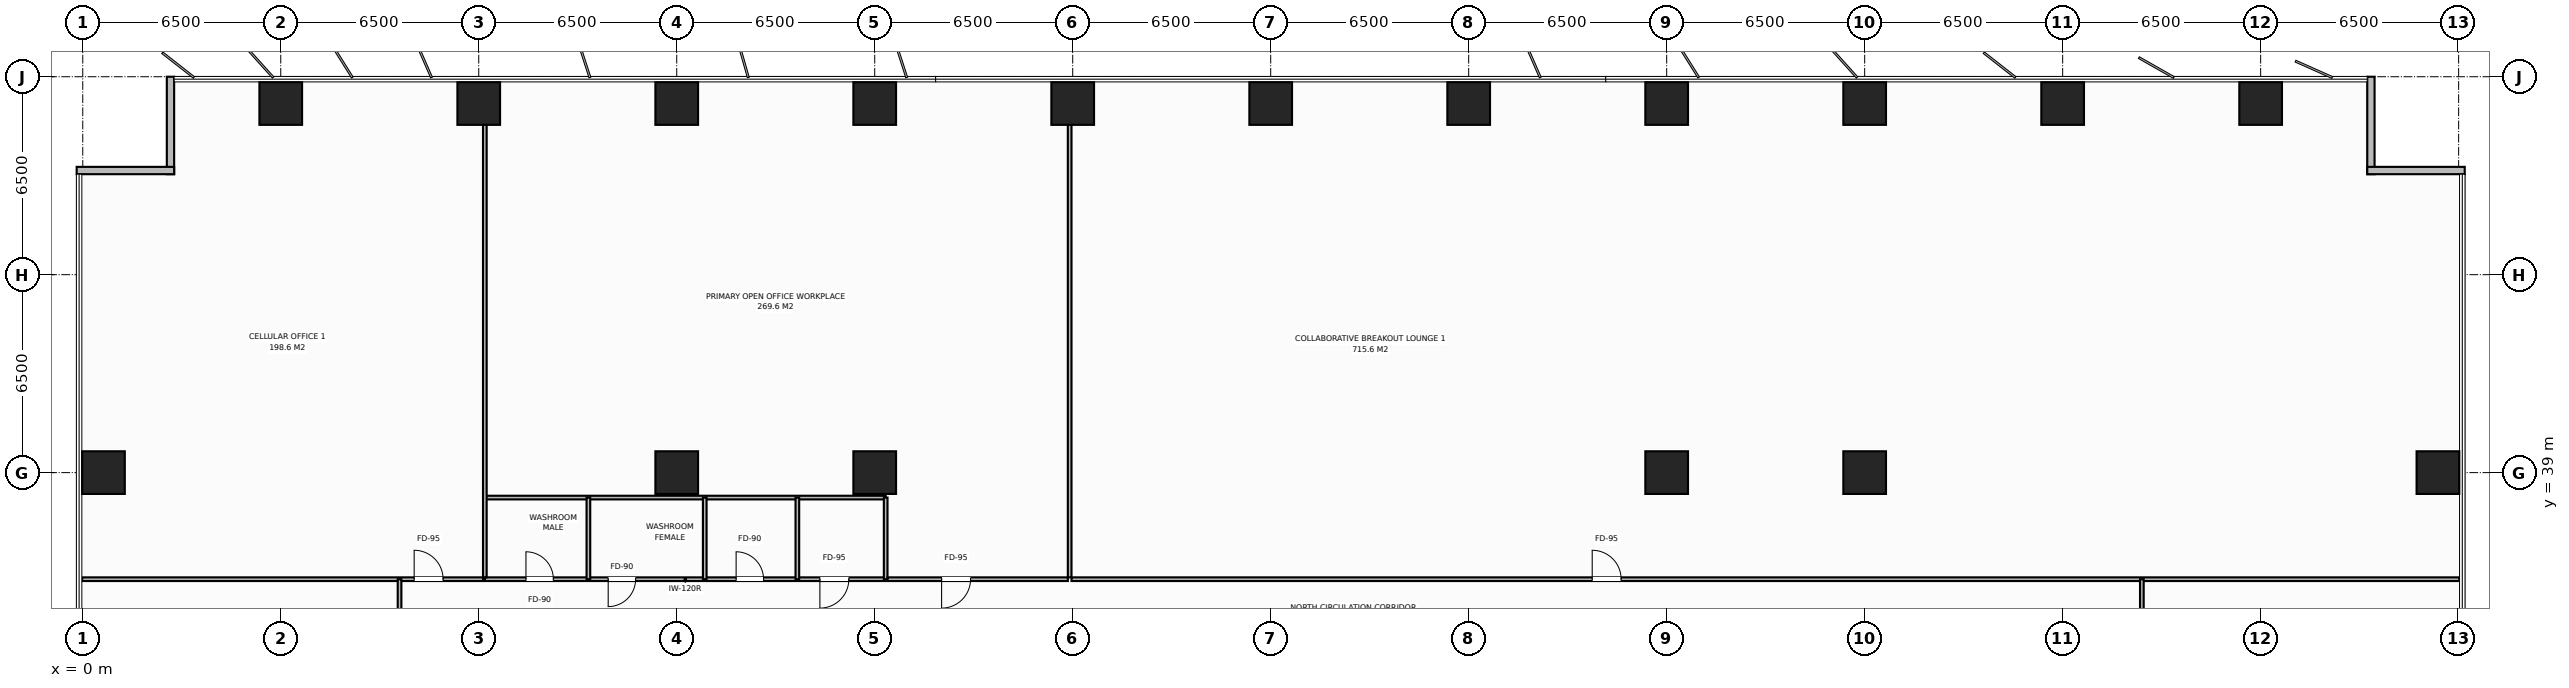
"""IFC4 building model, lengths in metres.
Left out: names, types, materials, properties, quantities, classifications, styles, units other than length and angle.
Written with IfcOpenShell. Run it as: python <this file> out.ifc"""

import sys

from ifc_helpers import new_model, si_unit, direction, frame, frame_2d, origin, origin_2d, place, context, subcontext, project, spatial, rectangle, extrude, element, fill, save


model = new_model("IFC4")
c1 = context("Model", 3, precision=1e-05, world=origin(), true_north=direction((0.0, 1.0)))
c2 = subcontext(c1, "Body", "Model", "MODEL_VIEW")
j1 = project(units=[si_unit("LENGTHUNIT", "METRE"), si_unit("PLANEANGLEUNIT", "RADIAN")], contexts=[c1])
p1 = place(None, origin())
s1 = spatial("IfcSite", under=j1, at=p1, CompositionType="ELEMENT")
p2 = place(p1, origin())
s2 = spatial("IfcBuilding", under=s1, at=p2, CompositionType="ELEMENT")
p3 = place(p2, frame((0.0, 0.0, 35.4)))
s3 = spatial("IfcBuildingStorey", under=s2, at=p3, CompositionType="ELEMENT", Elevation=35.4)
for number, where, z_axis, x_axis in (
    (1, (19.5, 39.0, 0.0), (0.0, 0.0, 1.0), (1.0, 0.0, 0.0)),
    (2, (58.5, 39.0, 0.0), (0.0, 0.0, 1.0), (1.0, 0.0, 0.0)),
    (3, (26.0, 39.0, 0.0), (0.0, 0.0, 1.0), (1.0, 0.0, 0.0)),
    (4, (52.0, 39.0, 0.0), (0.0, 0.0, 1.0), (1.0, 0.0, 0.0)),
    (5, (6.5, 51.12, 0.0), (0.0, 0.0, 1.0), (1.0, 0.0, 0.0)),
    (6, (13.0, 51.12, 0.0), (0.0, 0.0, 1.0), (1.0, 0.0, 0.0)),
    (7, (19.5, 51.12, 0.0), (0.0, 0.0, 1.0), (1.0, 0.0, 0.0)),
    (8, (26.0, 51.12, 0.0), (0.0, 0.0, 1.0), (1.0, 0.0, 0.0)),
    (9, (32.5, 51.12, 0.0), (0.0, 0.0, 1.0), (1.0, 0.0, 0.0)),
    (10, (39.0, 51.12, 0.0), (0.0, 0.0, 1.0), (1.0, 0.0, 0.0)),
    (11, (45.5, 51.12, 0.0), (0.0, 0.0, 1.0), (1.0, 0.0, 0.0)),
    (12, (52.0, 51.12, 0.0), (0.0, 0.0, 1.0), (1.0, 0.0, 0.0)),
    (13, (58.5, 51.12, 0.0), (0.0, 0.0, 1.0), (1.0, 0.0, 0.0)),
    (14, (65.0, 51.12, 0.0), (0.0, 0.0, 1.0), (1.0, 0.0, 0.0)),
    (15, (71.5, 51.12, 0.0), (0.0, 0.0, 1.0), (1.0, 0.0, 0.0)),
    (16, (0.68, 39.0, 0.0), (0.0, 0.0, 1.0), (1.0, 0.0, 0.0)),
    (17, (77.32, 39.0, 0.0), (0.0, 0.0, 1.0), (1.0, 0.0, 0.0)),
):
    element("IfcColumn", number, at=place(p3, frame(where, z_axis=z_axis, x_axis=x_axis)), inside=s3, PredefinedType="COLUMN", context=c2, shape_type="SweptSolid", body=[
        extrude(rectangle(XDim=1.4, YDim=1.4, at=origin_2d()), origin(), (0.0, 0.0, 1.0), 3.8),
    ])
for number, where, z_axis, x_axis in (
    (18, (2.88, 48.8, 0.0), (0.0, 0.0, 1.0), (0.0, 1.0, 0.0)),
    (19, (-0.2, 48.92, 0.0), (0.0, 0.0, 1.0), (1.0, 0.0, 0.0)),
    (20, (75.12, 52.0, 0.0), (0.0, 0.0, 1.0), (0.0, -1.0, 0.0)),
    (21, (75.0, 48.92, 0.0), (0.0, 0.0, 1.0), (1.0, 0.0, 0.0)),
):
    element("IfcWall", number, at=place(p3, frame(where, z_axis=z_axis, x_axis=x_axis)), inside=s3, PredefinedType="STANDARD", context=c2, shape_type="SweptSolid", body=[
        extrude(rectangle(XDim=3.2, YDim=0.24, at=frame_2d((1.6, 0.0))), origin(), (0.0, 0.0, 1.0), 3.55),
    ])
p4 = place(p3, frame((13.2, 35.5, 0.0), z_axis=(0.0, 0.0, 1.0), x_axis=(1.0, 0.0, 0.0)))
e22 = element("IfcWall", 22, at=p4, inside=s3, PredefinedType="PARTITIONING", context=c2, shape_type="SweptSolid", body=[
    extrude(rectangle(XDim=13.16, YDim=0.12, at=frame_2d((6.58, 0.0))), origin(), (0.0, 0.0, 1.0), 3.55),
])
p5 = place(p4, frame((1.35, 0.0, 0.0)))
e23 = element("IfcOpeningElement", 23, at=p5, cuts=e22, PredefinedType="OPENING", context=c2, shape_type="SweptSolid", body=[
    extrude(rectangle(XDim=0.9, YDim=2.15, at=frame_2d((0.45, 1.075))), frame((0.0, 0.07, 0.0), z_axis=(0.0, -1.0, 0.0), x_axis=(1.0, 0.0, 0.0)), (0.0, 0.0, 1.0), 0.14),
])
p6 = place(p4, frame((4.05, 0.0, 0.0)))
e24 = element("IfcOpeningElement", 24, at=p6, cuts=e22, PredefinedType="OPENING", context=c2, shape_type="SweptSolid", body=[
    extrude(rectangle(XDim=0.9, YDim=2.15, at=frame_2d((0.45, 1.075))), frame((0.0, 0.07, 0.0), z_axis=(0.0, -1.0, 0.0), x_axis=(1.0, 0.0, 0.0)), (0.0, 0.0, 1.0), 0.14),
])
p7 = place(p4, frame((8.25, 0.0, 0.0)))
e25 = element("IfcOpeningElement", 25, at=p7, cuts=e22, PredefinedType="OPENING", context=c2, shape_type="SweptSolid", body=[
    extrude(rectangle(XDim=0.9, YDim=2.15, at=frame_2d((0.45, 1.075))), frame((0.0, 0.07, 0.0), z_axis=(0.0, -1.0, 0.0), x_axis=(1.0, 0.0, 0.0)), (0.0, 0.0, 1.0), 0.14),
])
p8 = place(p4, frame((11.0, 0.0, 0.0)))
e26 = element("IfcOpeningElement", 26, at=p8, cuts=e22, PredefinedType="OPENING", context=c2, shape_type="SweptSolid", body=[
    extrude(rectangle(XDim=0.95, YDim=2.15, at=frame_2d((0.475, 1.075))), frame((0.0, 0.07, 0.0), z_axis=(0.0, -1.0, 0.0), x_axis=(1.0, 0.0, 0.0)), (0.0, 0.0, 1.0), 0.14),
])
p9 = place(p3, frame((13.2, 38.18, 0.0), z_axis=(0.0, 0.0, 1.0), x_axis=(1.0, 0.0, 0.0)))
e27 = element("IfcWall", 27, at=p9, inside=s3, PredefinedType="PARTITIONING", context=c2, shape_type="SweptSolid", body=[
    extrude(rectangle(XDim=13.16, YDim=0.12, at=frame_2d((6.58, 0.0))), origin(), (0.0, 0.0, 1.0), 3.55),
])
for number, where, z_axis, x_axis in (
    (28, (16.6, 35.5, 0.0), (0.0, 0.0, 1.0), (0.0, 1.0, 0.0)),
    (29, (20.42, 35.5, 0.0), (0.0, 0.0, 1.0), (0.0, 1.0, 0.0)),
    (30, (23.46, 35.5, 0.0), (0.0, 0.0, 1.0), (0.0, 1.0, 0.0)),
    (31, (26.36, 35.5, 0.0), (0.0, 0.0, 1.0), (0.0, 1.0, 0.0)),
):
    element("IfcWall", number, at=place(p3, frame(where, z_axis=z_axis, x_axis=x_axis)), inside=s3, PredefinedType="PARTITIONING", context=c2, shape_type="SweptSolid", body=[
        extrude(rectangle(XDim=2.68, YDim=0.12, at=frame_2d((1.34, 0.0))), origin(), (0.0, 0.0, 1.0), 3.55),
    ])
p10 = place(p3, frame((13.2, 35.56, 0.0), z_axis=(0.0, 0.0, 1.0), x_axis=(0.0, 1.0, 0.0)))
e32 = element("IfcWall", 32, at=p10, inside=s3, PredefinedType="PARTITIONING", context=c2, shape_type="SweptSolid", body=[
    extrude(rectangle(XDim=16.42, YDim=0.12, at=frame_2d((8.21, 0.0))), origin(), (0.0, 0.0, 1.0), 2.9),
])
p11 = place(p3, frame((-0.02, 35.5, 0.0), z_axis=(0.0, 0.0, 1.0), x_axis=(1.0, 0.0, 0.0)))
e33 = element("IfcWall", 33, at=p11, inside=s3, PredefinedType="PARTITIONING", context=c2, shape_type="SweptSolid", body=[
    extrude(rectangle(XDim=13.16, YDim=0.12, at=frame_2d((6.58, 0.0))), origin(), (0.0, 0.0, 1.0), 3.55),
])
p12 = place(p11, frame((10.9, 0.0, 0.0)))
e34 = element("IfcOpeningElement", 34, at=p12, cuts=e33, PredefinedType="OPENING", context=c2, shape_type="SweptSolid", body=[
    extrude(rectangle(XDim=0.95, YDim=2.15, at=frame_2d((0.475, 1.075))), frame((0.0, 0.07, 0.0), z_axis=(0.0, -1.0, 0.0), x_axis=(1.0, 0.0, 0.0)), (0.0, 0.0, 1.0), 0.14),
])
p13 = place(p3, frame((32.4, 35.56, 0.0), z_axis=(0.0, 0.0, 1.0), x_axis=(0.0, 1.0, 0.0)))
e35 = element("IfcWall", 35, at=p13, inside=s3, PredefinedType="PARTITIONING", context=c2, shape_type="SweptSolid", body=[
    extrude(rectangle(XDim=16.42, YDim=0.12, at=frame_2d((8.21, 0.0))), origin(), (0.0, 0.0, 1.0), 2.9),
])
p14 = place(p3, frame((26.42, 35.5, 0.0), z_axis=(0.0, 0.0, 1.0), x_axis=(1.0, 0.0, 0.0)))
e36 = element("IfcWall", 36, at=p14, inside=s3, PredefinedType="PARTITIONING", context=c2, shape_type="SweptSolid", body=[
    extrude(rectangle(XDim=5.92, YDim=0.12, at=frame_2d((2.96, 0.0))), origin(), (0.0, 0.0, 1.0), 3.55),
])
p15 = place(p14, frame((1.776, 0.0, 0.0)))
e37 = element("IfcOpeningElement", 37, at=p15, cuts=e36, PredefinedType="OPENING", context=c2, shape_type="SweptSolid", body=[
    extrude(rectangle(XDim=0.95, YDim=2.15, at=frame_2d((0.475, 1.075))), frame((0.0, 0.07, 0.0), z_axis=(0.0, -1.0, 0.0), x_axis=(1.0, 0.0, 0.0)), (0.0, 0.0, 1.0), 0.14),
])
p16 = place(p3, frame((32.46, 35.5, 0.0), z_axis=(0.0, 0.0, 1.0), x_axis=(1.0, 0.0, 0.0)))
e38 = element("IfcWall", 38, at=p16, inside=s3, PredefinedType="PARTITIONING", context=c2, shape_type="SweptSolid", body=[
    extrude(rectangle(XDim=45.56, YDim=0.12, at=frame_2d((22.78, 0.0))), origin(), (0.0, 0.0, 1.0), 3.55),
])
p17 = place(p16, frame((17.095, 0.0, 0.0)))
e39 = element("IfcOpeningElement", 39, at=p17, cuts=e38, PredefinedType="OPENING", context=c2, shape_type="SweptSolid", body=[
    extrude(rectangle(XDim=0.95, YDim=2.15, at=frame_2d((0.475, 1.075))), frame((0.0, 0.07, 0.0), z_axis=(0.0, -1.0, 0.0), x_axis=(1.0, 0.0, 0.0)), (0.0, 0.0, 1.0), 0.14),
])
p18 = place(p3, frame((10.4, 16.5, 0.0), z_axis=(0.0, 0.0, 1.0), x_axis=(0.0, 1.0, 0.0)))
e40 = element("IfcWall", 40, at=p18, inside=s3, PredefinedType="PARTITIONING", context=c2, shape_type="SweptSolid", body=[
    extrude(rectangle(XDim=19.0, YDim=0.12, at=frame_2d((9.5, 0.0))), origin(), (0.0, 0.0, 1.0), 3.55),
])
p19 = place(p18, frame((9.025, 0.0, 0.0)))
e41 = element("IfcOpeningElement", 41, at=p19, cuts=e40, PredefinedType="OPENING", context=c2, shape_type="SweptSolid", body=[
    extrude(rectangle(XDim=0.95, YDim=2.15, at=frame_2d((0.475, 1.075))), frame((0.0, 0.07, 0.0), z_axis=(0.0, -1.0, 0.0), x_axis=(1.0, 0.0, 0.0)), (0.0, 0.0, 1.0), 0.14),
])
p20 = place(p3, frame((67.6, 26.0, 0.0), z_axis=(0.0, 0.0, 1.0), x_axis=(0.0, 1.0, 0.0)))
e42 = element("IfcWall", 42, at=p20, inside=s3, PredefinedType="PARTITIONING", context=c2, shape_type="SweptSolid", body=[
    extrude(rectangle(XDim=9.5, YDim=0.12, at=frame_2d((4.75, 0.0))), origin(), (0.0, 0.0, 1.0), 3.55),
])
p21 = place(p20, frame((3.225, 0.0, 0.0)))
e43 = element("IfcOpeningElement", 43, at=p21, cuts=e42, PredefinedType="OPENING", context=c2, shape_type="SweptSolid", body=[
    extrude(rectangle(XDim=0.95, YDim=2.15, at=frame_2d((0.475, 1.075))), frame((0.0, 0.07, 0.0), z_axis=(0.0, -1.0, 0.0), x_axis=(1.0, 0.0, 0.0)), (0.0, 0.0, 1.0), 0.14),
])
p22 = place(p5, origin())
e44 = element("IfcDoor", 44, at=p22, inside=s3, OperationType="SINGLE_SWING_LEFT", PredefinedType="DOOR", context=c2, shape_type="SweptSolid", body=[
    extrude(rectangle(XDim=0.9, YDim=2.15, at=frame_2d((0.45, 1.075))), frame((0.0, 0.025, 0.0), z_axis=(0.0, -1.0, 0.0), x_axis=(1.0, 0.0, 0.0)), (0.0, 0.0, 1.0), 0.05),
])
fill(e23, e44)
p23 = place(p6, origin())
e45 = element("IfcDoor", 45, at=p23, inside=s3, OperationType="SINGLE_SWING_RIGHT", PredefinedType="DOOR", context=c2, shape_type="SweptSolid", body=[
    extrude(rectangle(XDim=0.9, YDim=2.15, at=frame_2d((0.45, 1.075))), frame((0.0, 0.025, 0.0), z_axis=(0.0, -1.0, 0.0), x_axis=(1.0, 0.0, 0.0)), (0.0, 0.0, 1.0), 0.05),
])
fill(e24, e45)
p24 = place(p7, origin())
e46 = element("IfcDoor", 46, at=p24, inside=s3, OperationType="SINGLE_SWING_LEFT", PredefinedType="DOOR", context=c2, shape_type="SweptSolid", body=[
    extrude(rectangle(XDim=0.9, YDim=2.15, at=frame_2d((0.45, 1.075))), frame((0.0, 0.025, 0.0), z_axis=(0.0, -1.0, 0.0), x_axis=(1.0, 0.0, 0.0)), (0.0, 0.0, 1.0), 0.05),
])
fill(e25, e46)
p25 = place(p8, origin())
e47 = element("IfcDoor", 47, at=p25, inside=s3, OperationType="SINGLE_SWING_RIGHT", PredefinedType="DOOR", context=c2, shape_type="SweptSolid", body=[
    extrude(rectangle(XDim=0.95, YDim=2.15, at=frame_2d((0.475, 1.075))), frame((0.0, 0.025, 0.0), z_axis=(0.0, -1.0, 0.0), x_axis=(1.0, 0.0, 0.0)), (0.0, 0.0, 1.0), 0.05),
])
fill(e26, e47)
p26 = place(p12, origin())
e48 = element("IfcDoor", 48, at=p26, inside=s3, OperationType="SINGLE_SWING_LEFT", PredefinedType="DOOR", context=c2, shape_type="SweptSolid", body=[
    extrude(rectangle(XDim=0.95, YDim=2.15, at=frame_2d((0.475, 1.075))), frame((0.0, 0.025, 0.0), z_axis=(0.0, -1.0, 0.0), x_axis=(1.0, 0.0, 0.0)), (0.0, 0.0, 1.0), 0.05),
])
fill(e34, e48)
p27 = place(p15, origin())
e49 = element("IfcDoor", 49, at=p27, inside=s3, OperationType="SINGLE_SWING_RIGHT", PredefinedType="DOOR", context=c2, shape_type="SweptSolid", body=[
    extrude(rectangle(XDim=0.95, YDim=2.15, at=frame_2d((0.475, 1.075))), frame((0.0, 0.025, 0.0), z_axis=(0.0, -1.0, 0.0), x_axis=(1.0, 0.0, 0.0)), (0.0, 0.0, 1.0), 0.05),
])
fill(e37, e49)
p28 = place(p17, origin())
e50 = element("IfcDoor", 50, at=p28, inside=s3, OperationType="SINGLE_SWING_LEFT", PredefinedType="DOOR", context=c2, shape_type="SweptSolid", body=[
    extrude(rectangle(XDim=0.95, YDim=2.15, at=frame_2d((0.475, 1.075))), frame((0.0, 0.025, 0.0), z_axis=(0.0, -1.0, 0.0), x_axis=(1.0, 0.0, 0.0)), (0.0, 0.0, 1.0), 0.05),
])
fill(e39, e50)
save(model, sys.argv[1])
